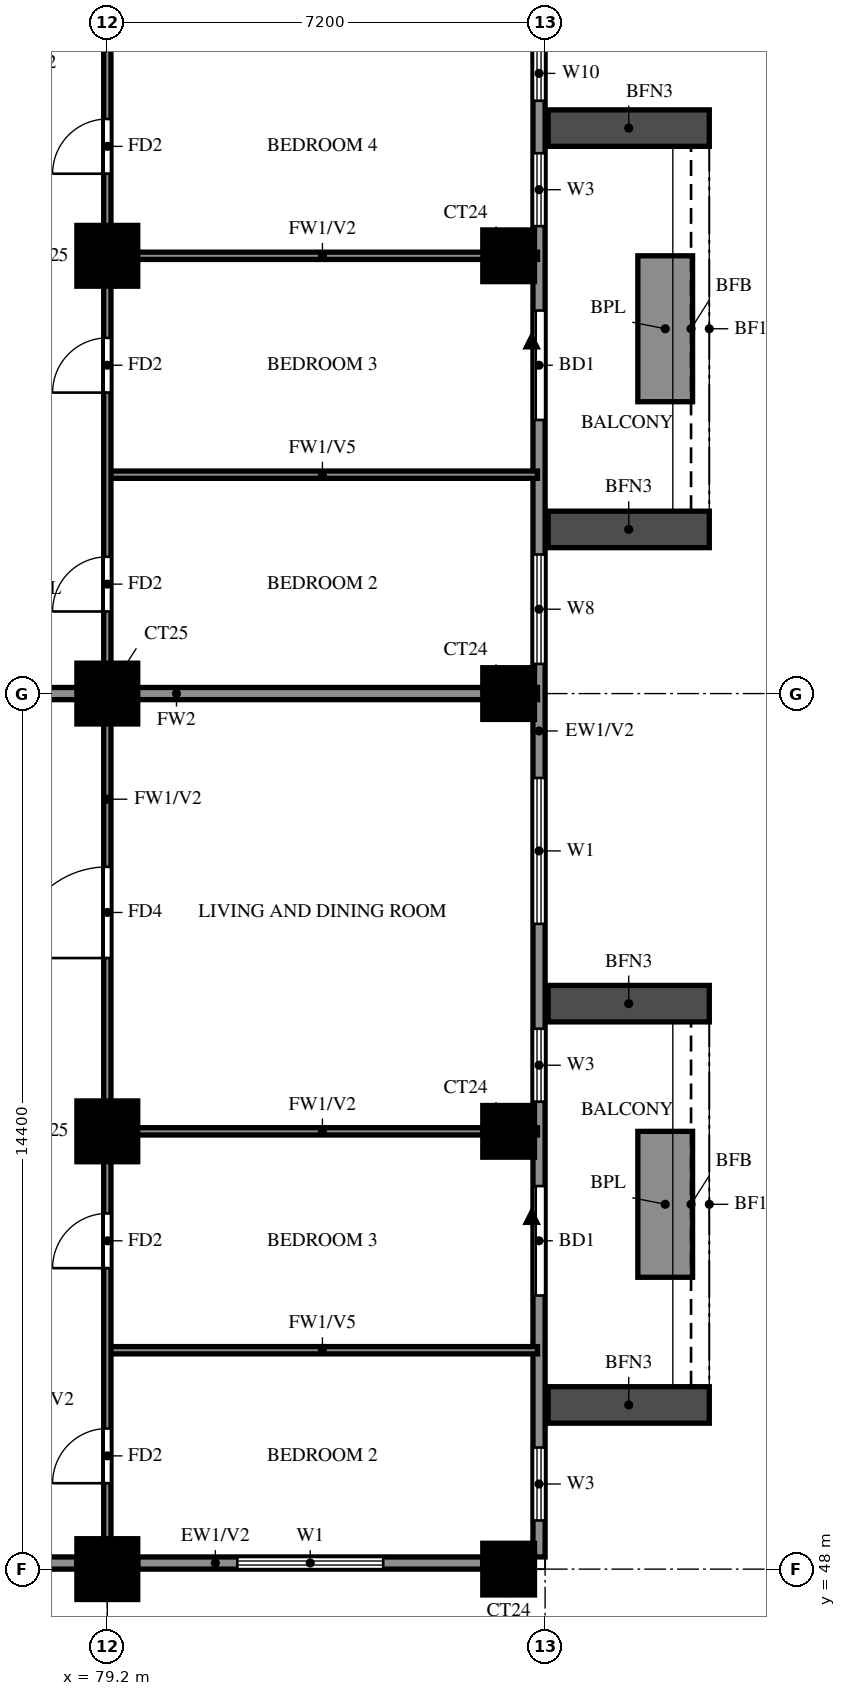
"""IFC4 building model, lengths in metres.
Left out: names, types, materials, properties, quantities, classifications, styles, units other than length and angle.
Written with IfcOpenShell. Run it as: python <this file> out.ifc"""

import sys

from ifc_helpers import new_model, si_unit, direction, frame, frame_2d, origin, origin_2d, place, context, subcontext, project, spatial, rectangle, extrude, source, transform, mapped, element, fill, save


model = new_model("IFC4")
c1 = context("Model", 3, precision=1e-05, world=origin(), true_north=direction((0.0, 1.0)))
c2 = subcontext(c1, "Body", "Model", "MODEL_VIEW")
j1 = project(units=[si_unit("LENGTHUNIT", "METRE"), si_unit("PLANEANGLEUNIT", "RADIAN")], contexts=[c1])
p1 = place(None, origin())
s1 = spatial("IfcSite", under=j1, at=p1, CompositionType="ELEMENT")
p2 = place(p1, origin())
s2 = spatial("IfcBuilding", under=s1, at=p2, CompositionType="ELEMENT")
p3 = place(p2, frame((0.0, 0.0, 160.5)))
s3 = spatial("IfcBuildingStorey", under=s2, at=p3, CompositionType="ELEMENT", Elevation=160.5)
m1 = source(origin(), c2, "Body", "SweptSolid", [
    extrude(rectangle(XDim=1.0, YDim=1.0, at=origin_2d()), origin(), (0.0, 0.0, 1.0), 3.2),
])
p4 = place(p3, frame((79.2, 48.0, 0.0), z_axis=(0.0, 0.0, 1.0), x_axis=(1.0, 0.0, 0.0)))
e1 = element("IfcColumn", 1, at=p4, inside=s3, PredefinedType="COLUMN", context=c2, shape_type="MappedRepresentation", body=[
    mapped(m1, transform((0.0, 0.0, 0.0))),
])
m2 = source(origin(), c2, "Body", "SweptSolid", [
    extrude(rectangle(XDim=0.85, YDim=0.85, at=origin_2d()), origin(), (0.0, 0.0, 1.0), 3.2),
])
p5 = place(p3, frame((85.8, 48.0, 0.0), z_axis=(0.0, 0.0, 1.0), x_axis=(1.0, 0.0, 0.0)))
e2 = element("IfcColumn", 2, at=p5, inside=s3, PredefinedType="COLUMN", context=c2, shape_type="MappedRepresentation", body=[
    mapped(m2, transform((0.0, 0.0, 0.0))),
])
p6 = place(p3, frame((79.2, 55.2, 0.0), z_axis=(0.0, 0.0, 1.0), x_axis=(1.0, 0.0, 0.0)))
e3 = element("IfcColumn", 3, at=p6, inside=s3, PredefinedType="COLUMN", context=c2, shape_type="MappedRepresentation", body=[
    mapped(m1, transform((0.0, 0.0, 0.0))),
])
p7 = place(p3, frame((85.8, 55.2, 0.0), z_axis=(0.0, 0.0, 1.0), x_axis=(1.0, 0.0, 0.0)))
e4 = element("IfcColumn", 4, at=p7, inside=s3, PredefinedType="COLUMN", context=c2, shape_type="MappedRepresentation", body=[
    mapped(m2, transform((0.0, 0.0, 0.0))),
])
p8 = place(p3, frame((79.2, 62.4, 0.0), z_axis=(0.0, 0.0, 1.0), x_axis=(1.0, 0.0, 0.0)))
e5 = element("IfcColumn", 5, at=p8, inside=s3, PredefinedType="COLUMN", context=c2, shape_type="MappedRepresentation", body=[
    mapped(m1, transform((0.0, 0.0, 0.0))),
])
p9 = place(p3, frame((85.8, 62.4, 0.0), z_axis=(0.0, 0.0, 1.0), x_axis=(1.0, 0.0, 0.0)))
e6 = element("IfcColumn", 6, at=p9, inside=s3, PredefinedType="COLUMN", context=c2, shape_type="MappedRepresentation", body=[
    mapped(m2, transform((0.0, 0.0, 0.0))),
])
p10 = place(p3, frame((79.2, 69.6, 0.0), z_axis=(0.0, 0.0, 1.0), x_axis=(1.0, 0.0, 0.0)))
e7 = element("IfcColumn", 7, at=p10, inside=s3, PredefinedType="COLUMN", context=c2, shape_type="MappedRepresentation", body=[
    mapped(m1, transform((0.0, 0.0, 0.0))),
])
p11 = place(p3, frame((85.8, 69.6, 0.0), z_axis=(0.0, 0.0, 1.0), x_axis=(1.0, 0.0, 0.0)))
e8 = element("IfcColumn", 8, at=p11, inside=s3, PredefinedType="COLUMN", context=c2, shape_type="MappedRepresentation", body=[
    mapped(m2, transform((0.0, 0.0, 0.0))),
])
p12 = place(p3, frame((85.719, 39.881, 0.0), z_axis=(0.0, 0.0, 1.0), x_axis=(-0.86377618652, 0.503875678716, 0.0)))
e9 = element("IfcWall", 9, at=p12, inside=s3, PredefinedType="SOLIDWALL", context=c2, shape_type="SweptSolid", body=[
    extrude(rectangle(XDim=16.311, YDim=0.2, at=frame_2d((8.156, 0.0))), origin(), (0.0, 0.0, 1.0), 3.2),
])
p13 = place(p12, frame((13.326, 0.0, 1.5)))
e10 = element("IfcOpeningElement", 10, at=p13, cuts=e9, PredefinedType="OPENING", context=c2, shape_type="SweptSolid", body=[
    extrude(rectangle(XDim=0.9, YDim=0.9, at=frame_2d((0.45, 0.45))), frame((0.0, 0.11, 0.0), z_axis=(0.0, -1.0, 0.0), x_axis=(1.0, 0.0, 0.0)), (0.0, 0.0, 1.0), 0.22),
])
p14 = place(p3, frame((71.99, 48.1, 0.0), z_axis=(0.0, 0.0, 1.0), x_axis=(1.0, 0.0, 0.0)))
e11 = element("IfcWall", 11, at=p14, inside=s3, PredefinedType="SOLIDWALL", context=c2, shape_type="SweptSolid", body=[
    extrude(rectangle(XDim=6.71, YDim=0.2, at=frame_2d((3.355, 0.0))), origin(), (0.0, 0.0, 1.0), 3.2),
])
p15 = place(p3, frame((79.7, 48.1, 0.0), z_axis=(0.0, 0.0, 1.0), x_axis=(1.0, 0.0, 0.0)))
e12 = element("IfcWall", 12, at=p15, inside=s3, PredefinedType="SOLIDWALL", context=c2, shape_type="SweptSolid", body=[
    extrude(rectangle(XDim=5.675, YDim=0.2, at=frame_2d((2.837, 0.0))), origin(), (0.0, 0.0, 1.0), 3.2),
])
p16 = place(p15, frame((1.637, 0.0, 0.6)))
e13 = element("IfcOpeningElement", 13, at=p16, cuts=e12, PredefinedType="OPENING", context=c2, shape_type="SweptSolid", body=[
    extrude(rectangle(XDim=2.4, YDim=2.4, at=frame_2d((1.2, 1.2))), frame((0.0, 0.11, 0.0), z_axis=(0.0, -1.0, 0.0), x_axis=(1.0, 0.0, 0.0)), (0.0, 0.0, 1.0), 0.22),
])
p17 = place(p3, frame((86.3, 48.2, 0.0), z_axis=(0.0, 0.0, 1.0), x_axis=(0.0, 1.0, 0.0)))
e14 = element("IfcWall", 14, at=p17, inside=s3, PredefinedType="SOLIDWALL", context=c2, shape_type="SweptSolid", body=[
    extrude(rectangle(XDim=28.6, YDim=0.2, at=frame_2d((14.3, 0.0))), origin(), (0.0, 0.0, 1.0), 3.2),
])
p18 = place(p17, frame((4.3, 0.0, 0.0)))
e15 = element("IfcOpeningElement", 15, at=p18, cuts=e14, PredefinedType="OPENING", context=c2, shape_type="SweptSolid", body=[
    extrude(rectangle(XDim=1.8, YDim=2.4, at=frame_2d((0.9, 1.2))), frame((0.0, 0.11, 0.0), z_axis=(0.0, -1.0, 0.0), x_axis=(1.0, 0.0, 0.0)), (0.0, 0.0, 1.0), 0.22),
])
p19 = place(p17, frame((18.7, 0.0, 0.0)))
e16 = element("IfcOpeningElement", 16, at=p19, cuts=e14, PredefinedType="OPENING", context=c2, shape_type="SweptSolid", body=[
    extrude(rectangle(XDim=1.8, YDim=2.4, at=frame_2d((0.9, 1.2))), frame((0.0, 0.11, 0.0), z_axis=(0.0, -1.0, 0.0), x_axis=(1.0, 0.0, 0.0)), (0.0, 0.0, 1.0), 0.22),
])
p20 = place(p17, frame((0.6, 0.0, 0.6)))
e17 = element("IfcOpeningElement", 17, at=p20, cuts=e14, PredefinedType="OPENING", context=c2, shape_type="SweptSolid", body=[
    extrude(rectangle(XDim=1.2, YDim=2.4, at=frame_2d((0.6, 1.2))), frame((0.0, 0.11, 0.0), z_axis=(0.0, -1.0, 0.0), x_axis=(1.0, 0.0, 0.0)), (0.0, 0.0, 1.0), 0.22),
])
p21 = place(p17, frame((7.488, 0.0, 0.6)))
e18 = element("IfcOpeningElement", 18, at=p21, cuts=e14, PredefinedType="OPENING", context=c2, shape_type="SweptSolid", body=[
    extrude(rectangle(XDim=1.2, YDim=2.4, at=frame_2d((0.6, 1.2))), frame((0.0, 0.11, 0.0), z_axis=(0.0, -1.0, 0.0), x_axis=(1.0, 0.0, 0.0)), (0.0, 0.0, 1.0), 0.22),
])
p22 = place(p17, frame((10.413, 0.0, 0.6)))
e19 = element("IfcOpeningElement", 19, at=p22, cuts=e14, PredefinedType="OPENING", context=c2, shape_type="SweptSolid", body=[
    extrude(rectangle(XDim=2.4, YDim=2.4, at=frame_2d((1.2, 1.2))), frame((0.0, 0.11, 0.0), z_axis=(0.0, -1.0, 0.0), x_axis=(1.0, 0.0, 0.0)), (0.0, 0.0, 1.0), 0.22),
])
p23 = place(p17, frame((14.688, 0.0, 0.6)))
e20 = element("IfcOpeningElement", 20, at=p23, cuts=e14, PredefinedType="OPENING", context=c2, shape_type="SweptSolid", body=[
    extrude(rectangle(XDim=1.8, YDim=2.4, at=frame_2d((0.9, 1.2))), frame((0.0, 0.11, 0.0), z_axis=(0.0, -1.0, 0.0), x_axis=(1.0, 0.0, 0.0)), (0.0, 0.0, 1.0), 0.22),
])
p24 = place(p17, frame((21.887, 0.0, 0.6)))
e21 = element("IfcOpeningElement", 21, at=p24, cuts=e14, PredefinedType="OPENING", context=c2, shape_type="SweptSolid", body=[
    extrude(rectangle(XDim=1.2, YDim=2.4, at=frame_2d((0.6, 1.2))), frame((0.0, 0.11, 0.0), z_axis=(0.0, -1.0, 0.0), x_axis=(1.0, 0.0, 0.0)), (0.0, 0.0, 1.0), 0.22),
])
p25 = place(p17, frame((23.95, 0.0, 0.6)))
e22 = element("IfcOpeningElement", 22, at=p25, cuts=e14, PredefinedType="OPENING", context=c2, shape_type="SweptSolid", body=[
    extrude(rectangle(XDim=0.9, YDim=2.4, at=frame_2d((0.45, 1.2))), frame((0.0, 0.11, 0.0), z_axis=(0.0, -1.0, 0.0), x_axis=(1.0, 0.0, 0.0)), (0.0, 0.0, 1.0), 0.22),
])
p26 = place(p17, frame((25.413, 0.0, 0.6)))
e23 = element("IfcOpeningElement", 23, at=p26, cuts=e14, PredefinedType="OPENING", context=c2, shape_type="SweptSolid", body=[
    extrude(rectangle(XDim=2.4, YDim=2.4, at=frame_2d((1.2, 1.2))), frame((0.0, 0.11, 0.0), z_axis=(0.0, -1.0, 0.0), x_axis=(1.0, 0.0, 0.0)), (0.0, 0.0, 1.0), 0.22),
])
for number, where, z_axis, x_axis in (
    (24, (86.45, 50.7, 0.0), (0.0, 0.0, 1.0), (1.0, 0.0, 0.0)),
    (25, (86.45, 57.3, 0.0), (0.0, 0.0, 1.0), (1.0, 0.0, 0.0)),
):
    element("IfcWall", number, at=place(p3, frame(where, z_axis=z_axis, x_axis=x_axis)), inside=s3, PredefinedType="SOLIDWALL", context=c2, shape_type="SweptSolid", body=[
        extrude(rectangle(XDim=2.65, YDim=0.6, at=frame_2d((1.325, 0.0))), origin(), (0.0, 0.0, 1.0), 2.85),
    ])
p27 = place(p3, frame((88.375, 52.8, 0.0), z_axis=(0.0, 0.0, 1.0), x_axis=(0.0, 1.0, 0.0)))
e26 = element("IfcWall", 26, at=p27, inside=s3, PredefinedType="SOLIDWALL", context=c2, shape_type="SweptSolid", body=[
    extrude(rectangle(XDim=2.4, YDim=0.9, at=frame_2d((1.2, 0.0))), origin(), (0.0, 0.0, 1.0), 0.9),
])
for number, where, z_axis, x_axis in (
    (27, (86.45, 65.1, 0.0), (0.0, 0.0, 1.0), (1.0, 0.0, 0.0)),
    (28, (86.45, 71.7, 0.0), (0.0, 0.0, 1.0), (1.0, 0.0, 0.0)),
):
    element("IfcWall", number, at=place(p3, frame(where, z_axis=z_axis, x_axis=x_axis)), inside=s3, PredefinedType="SOLIDWALL", context=c2, shape_type="SweptSolid", body=[
        extrude(rectangle(XDim=2.65, YDim=0.6, at=frame_2d((1.325, 0.0))), origin(), (0.0, 0.0, 1.0), 2.85),
    ])
p28 = place(p3, frame((88.375, 67.2, 0.0), z_axis=(0.0, 0.0, 1.0), x_axis=(0.0, 1.0, 0.0)))
e29 = element("IfcWall", 29, at=p28, inside=s3, PredefinedType="SOLIDWALL", context=c2, shape_type="SweptSolid", body=[
    extrude(rectangle(XDim=2.4, YDim=0.9, at=frame_2d((1.2, 0.0))), origin(), (0.0, 0.0, 1.0), 0.9),
])
p29 = place(p3, frame((74.4, 62.4, 0.0), z_axis=(0.0, 0.0, 1.0), x_axis=(1.0, 0.0, 0.0)))
e30 = element("IfcWall", 30, at=p29, inside=s3, PredefinedType="SOLIDWALL", context=c2, shape_type="SweptSolid", body=[
    extrude(rectangle(XDim=11.875, YDim=0.2, at=frame_2d((5.938, 0.0))), origin(), (0.0, 0.0, 1.0), 3.2),
])
p30 = place(p3, frame((79.2, 51.6, 0.0), z_axis=(0.0, 0.0, 1.0), x_axis=(1.0, 0.0, 0.0)))
e31 = element("IfcWall", 31, at=p30, inside=s3, PredefinedType="PARTITIONING", context=c2, shape_type="SweptSolid", body=[
    extrude(rectangle(XDim=7.075, YDim=0.12, at=frame_2d((3.538, 0.0))), origin(), (0.0, 0.0, 1.0), 2.3),
])
p31 = place(p3, frame((79.2, 55.2, 0.0), z_axis=(0.0, 0.0, 1.0), x_axis=(1.0, 0.0, 0.0)))
e32 = element("IfcWall", 32, at=p31, inside=s3, PredefinedType="PARTITIONING", context=c2, shape_type="SweptSolid", body=[
    extrude(rectangle(XDim=7.075, YDim=0.12, at=frame_2d((3.538, 0.0))), origin(), (0.0, 0.0, 1.0), 3.2),
])
p32 = place(p3, frame((79.2, 66.0, 0.0), z_axis=(0.0, 0.0, 1.0), x_axis=(1.0, 0.0, 0.0)))
e33 = element("IfcWall", 33, at=p32, inside=s3, PredefinedType="PARTITIONING", context=c2, shape_type="SweptSolid", body=[
    extrude(rectangle(XDim=7.075, YDim=0.12, at=frame_2d((3.538, 0.0))), origin(), (0.0, 0.0, 1.0), 2.3),
])
p33 = place(p3, frame((79.2, 69.6, 0.0), z_axis=(0.0, 0.0, 1.0), x_axis=(1.0, 0.0, 0.0)))
e34 = element("IfcWall", 34, at=p33, inside=s3, PredefinedType="PARTITIONING", context=c2, shape_type="SweptSolid", body=[
    extrude(rectangle(XDim=7.075, YDim=0.12, at=frame_2d((3.538, 0.0))), origin(), (0.0, 0.0, 1.0), 3.2),
])
p34 = place(p3, frame((79.2, 48.125, 0.0), z_axis=(0.0, 0.0, 1.0), x_axis=(0.0, 1.0, 0.0)))
e35 = element("IfcWall", 35, at=p34, inside=s3, PredefinedType="PARTITIONING", context=c2, shape_type="SweptSolid", body=[
    extrude(rectangle(XDim=25.075, YDim=0.12, at=frame_2d((12.538, 0.0))), origin(), (0.0, 0.0, 1.0), 3.2),
])
p35 = place(p34, frame((1.288, 0.0, 0.0)))
e36 = element("IfcOpeningElement", 36, at=p35, cuts=e35, PredefinedType="OPENING", context=c2, shape_type="SweptSolid", body=[
    extrude(rectangle(XDim=0.9, YDim=2.1, at=frame_2d((0.45, 1.05))), frame((0.0, 0.07, 0.0), z_axis=(0.0, -1.0, 0.0), x_axis=(1.0, 0.0, 0.0)), (0.0, 0.0, 1.0), 0.14),
])
p36 = place(p34, frame((4.825, 0.0, 0.0)))
e37 = element("IfcOpeningElement", 37, at=p36, cuts=e35, PredefinedType="OPENING", context=c2, shape_type="SweptSolid", body=[
    extrude(rectangle(XDim=0.9, YDim=2.1, at=frame_2d((0.45, 1.05))), frame((0.0, 0.07, 0.0), z_axis=(0.0, -1.0, 0.0), x_axis=(1.0, 0.0, 0.0)), (0.0, 0.0, 1.0), 0.14),
])
p37 = place(p34, frame((9.925, 0.0, 0.0)))
e38 = element("IfcOpeningElement", 38, at=p37, cuts=e35, PredefinedType="OPENING", context=c2, shape_type="SweptSolid", body=[
    extrude(rectangle(XDim=1.5, YDim=2.1, at=frame_2d((0.75, 1.05))), frame((0.0, 0.07, 0.0), z_axis=(0.0, -1.0, 0.0), x_axis=(1.0, 0.0, 0.0)), (0.0, 0.0, 1.0), 0.14),
])
p38 = place(p34, frame((15.625, 0.0, 0.0)))
e39 = element("IfcOpeningElement", 39, at=p38, cuts=e35, PredefinedType="OPENING", context=c2, shape_type="SweptSolid", body=[
    extrude(rectangle(XDim=0.9, YDim=2.1, at=frame_2d((0.45, 1.05))), frame((0.0, 0.07, 0.0), z_axis=(0.0, -1.0, 0.0), x_axis=(1.0, 0.0, 0.0)), (0.0, 0.0, 1.0), 0.14),
])
p39 = place(p34, frame((19.225, 0.0, 0.0)))
e40 = element("IfcOpeningElement", 40, at=p39, cuts=e35, PredefinedType="OPENING", context=c2, shape_type="SweptSolid", body=[
    extrude(rectangle(XDim=0.9, YDim=2.1, at=frame_2d((0.45, 1.05))), frame((0.0, 0.07, 0.0), z_axis=(0.0, -1.0, 0.0), x_axis=(1.0, 0.0, 0.0)), (0.0, 0.0, 1.0), 0.14),
])
p40 = place(p34, frame((22.825, 0.0, 0.0)))
e41 = element("IfcOpeningElement", 41, at=p40, cuts=e35, PredefinedType="OPENING", context=c2, shape_type="SweptSolid", body=[
    extrude(rectangle(XDim=0.9, YDim=2.1, at=frame_2d((0.45, 1.05))), frame((0.0, 0.07, 0.0), z_axis=(0.0, -1.0, 0.0), x_axis=(1.0, 0.0, 0.0)), (0.0, 0.0, 1.0), 0.14),
])
p41 = place(p16, origin())
e42 = element("IfcWindow", 42, at=p41, inside=s3, PartitioningType="DOUBLE_PANEL_VERTICAL", PredefinedType="WINDOW", context=c2, shape_type="SweptSolid", body=[
    extrude(rectangle(XDim=2.4, YDim=2.4, at=frame_2d((1.2, 1.2))), frame((0.0, 0.03, 0.0), z_axis=(0.0, -1.0, 0.0), x_axis=(1.0, 0.0, 0.0)), (0.0, 0.0, 1.0), 0.06),
])
fill(e13, e42)
p42 = place(p18, origin())
e43 = element("IfcDoor", 43, at=p42, inside=s3, OperationType="DOUBLE_DOOR_SLIDING", PredefinedType="DOOR", context=c2, shape_type="SweptSolid", body=[
    extrude(rectangle(XDim=1.8, YDim=2.4, at=frame_2d((0.9, 1.2))), frame((0.0, 0.025, 0.0), z_axis=(0.0, -1.0, 0.0), x_axis=(1.0, 0.0, 0.0)), (0.0, 0.0, 1.0), 0.05),
])
fill(e15, e43)
p43 = place(p19, origin())
e44 = element("IfcDoor", 44, at=p43, inside=s3, OperationType="DOUBLE_DOOR_SLIDING", PredefinedType="DOOR", context=c2, shape_type="SweptSolid", body=[
    extrude(rectangle(XDim=1.8, YDim=2.4, at=frame_2d((0.9, 1.2))), frame((0.0, 0.025, 0.0), z_axis=(0.0, -1.0, 0.0), x_axis=(1.0, 0.0, 0.0)), (0.0, 0.0, 1.0), 0.05),
])
fill(e16, e44)
p44 = place(p20, origin())
e45 = element("IfcWindow", 45, at=p44, inside=s3, PartitioningType="SINGLE_PANEL", PredefinedType="WINDOW", context=c2, shape_type="SweptSolid", body=[
    extrude(rectangle(XDim=1.2, YDim=2.4, at=frame_2d((0.6, 1.2))), frame((0.0, 0.03, 0.0), z_axis=(0.0, -1.0, 0.0), x_axis=(1.0, 0.0, 0.0)), (0.0, 0.0, 1.0), 0.06),
])
fill(e17, e45)
p45 = place(p21, origin())
e46 = element("IfcWindow", 46, at=p45, inside=s3, PartitioningType="SINGLE_PANEL", PredefinedType="WINDOW", context=c2, shape_type="SweptSolid", body=[
    extrude(rectangle(XDim=1.2, YDim=2.4, at=frame_2d((0.6, 1.2))), frame((0.0, 0.03, 0.0), z_axis=(0.0, -1.0, 0.0), x_axis=(1.0, 0.0, 0.0)), (0.0, 0.0, 1.0), 0.06),
])
fill(e18, e46)
p46 = place(p22, origin())
e47 = element("IfcWindow", 47, at=p46, inside=s3, PartitioningType="DOUBLE_PANEL_VERTICAL", PredefinedType="WINDOW", context=c2, shape_type="SweptSolid", body=[
    extrude(rectangle(XDim=2.4, YDim=2.4, at=frame_2d((1.2, 1.2))), frame((0.0, 0.03, 0.0), z_axis=(0.0, -1.0, 0.0), x_axis=(1.0, 0.0, 0.0)), (0.0, 0.0, 1.0), 0.06),
])
fill(e19, e47)
p47 = place(p23, origin())
e48 = element("IfcWindow", 48, at=p47, inside=s3, PartitioningType="DOUBLE_PANEL_VERTICAL", PredefinedType="WINDOW", context=c2, shape_type="SweptSolid", body=[
    extrude(rectangle(XDim=1.8, YDim=2.4, at=frame_2d((0.9, 1.2))), frame((0.0, 0.03, 0.0), z_axis=(0.0, -1.0, 0.0), x_axis=(1.0, 0.0, 0.0)), (0.0, 0.0, 1.0), 0.06),
])
fill(e20, e48)
p48 = place(p24, origin())
e49 = element("IfcWindow", 49, at=p48, inside=s3, PartitioningType="SINGLE_PANEL", PredefinedType="WINDOW", context=c2, shape_type="SweptSolid", body=[
    extrude(rectangle(XDim=1.2, YDim=2.4, at=frame_2d((0.6, 1.2))), frame((0.0, 0.03, 0.0), z_axis=(0.0, -1.0, 0.0), x_axis=(1.0, 0.0, 0.0)), (0.0, 0.0, 1.0), 0.06),
])
fill(e21, e49)
p49 = place(p25, origin())
e50 = element("IfcWindow", 50, at=p49, inside=s3, PartitioningType="SINGLE_PANEL", PredefinedType="WINDOW", context=c2, shape_type="SweptSolid", body=[
    extrude(rectangle(XDim=0.9, YDim=2.4, at=frame_2d((0.45, 1.2))), frame((0.0, 0.03, 0.0), z_axis=(0.0, -1.0, 0.0), x_axis=(1.0, 0.0, 0.0)), (0.0, 0.0, 1.0), 0.06),
])
fill(e22, e50)
p50 = place(p35, origin())
e51 = element("IfcDoor", 51, at=p50, inside=s3, OperationType="SINGLE_SWING_LEFT", PredefinedType="DOOR", context=c2, shape_type="SweptSolid", body=[
    extrude(rectangle(XDim=0.9, YDim=2.1, at=frame_2d((0.45, 1.05))), frame((0.0, 0.025, 0.0), z_axis=(0.0, -1.0, 0.0), x_axis=(1.0, 0.0, 0.0)), (0.0, 0.0, 1.0), 0.05),
])
fill(e36, e51)
p51 = place(p36, origin())
e52 = element("IfcDoor", 52, at=p51, inside=s3, OperationType="SINGLE_SWING_RIGHT", PredefinedType="DOOR", context=c2, shape_type="SweptSolid", body=[
    extrude(rectangle(XDim=0.9, YDim=2.1, at=frame_2d((0.45, 1.05))), frame((0.0, 0.025, 0.0), z_axis=(0.0, -1.0, 0.0), x_axis=(1.0, 0.0, 0.0)), (0.0, 0.0, 1.0), 0.05),
])
fill(e37, e52)
p52 = place(p37, origin())
e53 = element("IfcDoor", 53, at=p52, inside=s3, OperationType="SINGLE_SWING_LEFT", PredefinedType="DOOR", context=c2, shape_type="SweptSolid", body=[
    extrude(rectangle(XDim=1.5, YDim=2.1, at=frame_2d((0.75, 1.05))), frame((0.0, 0.025, 0.0), z_axis=(0.0, -1.0, 0.0), x_axis=(1.0, 0.0, 0.0)), (0.0, 0.0, 1.0), 0.05),
])
fill(e38, e53)
p53 = place(p38, origin())
e54 = element("IfcDoor", 54, at=p53, inside=s3, OperationType="SINGLE_SWING_LEFT", PredefinedType="DOOR", context=c2, shape_type="SweptSolid", body=[
    extrude(rectangle(XDim=0.9, YDim=2.1, at=frame_2d((0.45, 1.05))), frame((0.0, 0.025, 0.0), z_axis=(0.0, -1.0, 0.0), x_axis=(1.0, 0.0, 0.0)), (0.0, 0.0, 1.0), 0.05),
])
fill(e39, e54)
p54 = place(p39, origin())
e55 = element("IfcDoor", 55, at=p54, inside=s3, OperationType="SINGLE_SWING_RIGHT", PredefinedType="DOOR", context=c2, shape_type="SweptSolid", body=[
    extrude(rectangle(XDim=0.9, YDim=2.1, at=frame_2d((0.45, 1.05))), frame((0.0, 0.025, 0.0), z_axis=(0.0, -1.0, 0.0), x_axis=(1.0, 0.0, 0.0)), (0.0, 0.0, 1.0), 0.05),
])
fill(e40, e55)
p55 = place(p40, origin())
e56 = element("IfcDoor", 56, at=p55, inside=s3, OperationType="SINGLE_SWING_LEFT", PredefinedType="DOOR", context=c2, shape_type="SweptSolid", body=[
    extrude(rectangle(XDim=0.9, YDim=2.1, at=frame_2d((0.45, 1.05))), frame((0.0, 0.025, 0.0), z_axis=(0.0, -1.0, 0.0), x_axis=(1.0, 0.0, 0.0)), (0.0, 0.0, 1.0), 0.05),
])
fill(e41, e56)
save(model, sys.argv[1])
